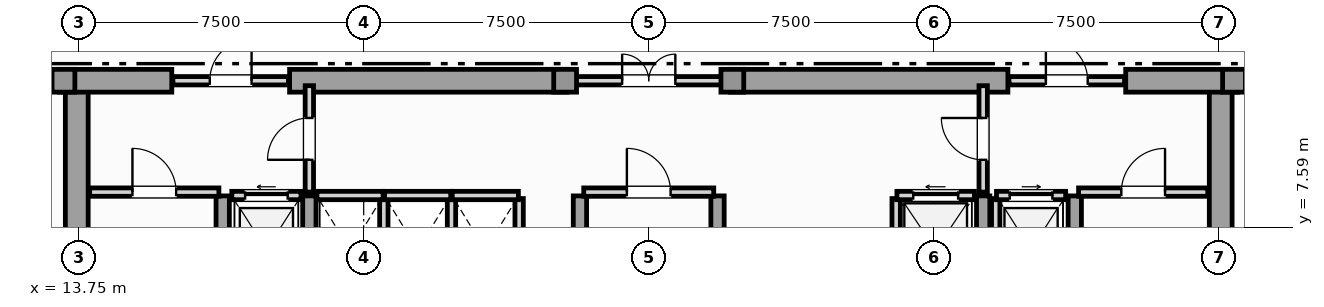
"""IFC4 building model, lengths in metres.
Left out: names, types, materials, properties, quantities, classifications, styles, units other than length and angle.
Written with IfcOpenShell. Run it as: python <this file> out.ifc"""

import sys

from ifc_helpers import new_model, si_unit, direction, frame, frame_2d, origin, origin_2d, place, context, subcontext, project, spatial, rectangle, extrude, element, fill, save


model = new_model("IFC4")
c1 = context("Model", 3, precision=1e-05, world=origin(), true_north=direction((0.0, 1.0)))
c2 = subcontext(c1, "Body", "Model", "MODEL_VIEW")
j1 = project(units=[si_unit("LENGTHUNIT", "METRE"), si_unit("PLANEANGLEUNIT", "RADIAN")], contexts=[c1])
p1 = place(None, origin())
s1 = spatial("IfcSite", under=j1, at=p1, CompositionType="ELEMENT")
p2 = place(p1, origin())
s2 = spatial("IfcBuilding", under=s1, at=p2, CompositionType="ELEMENT")
p3 = place(p2, frame((0.0, 0.0, 234.95)))
s3 = spatial("IfcBuildingStorey", under=s2, at=p3, CompositionType="ELEMENT", Elevation=234.95)
for number, where, z_axis, x_axis in (
    (1, (13.7, 0.92, 0.0), (0.0, 0.0, 1.0), (0.0, 1.0, 0.0)),
    (2, (43.8, 0.92, 0.0), (0.0, 0.0, 1.0), (0.0, 1.0, 0.0)),
):
    element("IfcWall", number, at=place(p3, frame(where, z_axis=z_axis, x_axis=x_axis)), inside=s3, PredefinedType="SHEAR", context=c2, shape_type="SweptSolid", body=[
        extrude(rectangle(XDim=10.53, YDim=0.6, at=frame_2d((5.265, 0.0))), origin(), (0.0, 0.0, 1.0), 3.63),
    ])
p4 = place(p3, frame((13.25, 11.45, 0.0), z_axis=(0.0, 0.0, 1.0), x_axis=(1.0, 0.0, 0.0)))
e3 = element("IfcWall", 3, at=p4, inside=s3, PredefinedType="SHEAR", context=c2, shape_type="SweptSolid", body=[
    extrude(rectangle(XDim=2.95, YDim=0.6, at=frame_2d((1.475, 0.0))), origin(), (0.0, 0.0, 1.0), 3.63),
])
for number, where, z_axis, x_axis in (
    (4, (19.3, 11.45, 0.0), (0.0, 0.0, 1.0), (1.0, 0.0, 0.0)),
    (5, (30.9, 11.45, 0.0), (0.0, 0.0, 1.0), (1.0, 0.0, 0.0)),
):
    element("IfcWall", number, at=place(p3, frame(where, z_axis=z_axis, x_axis=x_axis)), inside=s3, PredefinedType="SHEAR", context=c2, shape_type="SweptSolid", body=[
        extrude(rectangle(XDim=7.3, YDim=0.6, at=frame_2d((3.65, 0.0))), origin(), (0.0, 0.0, 1.0), 3.63),
    ])
p5 = place(p3, frame((41.3, 11.45, 0.0), z_axis=(0.0, 0.0, 1.0), x_axis=(1.0, 0.0, 0.0)))
e6 = element("IfcWall", 6, at=p5, inside=s3, PredefinedType="SHEAR", context=c2, shape_type="SweptSolid", body=[
    extrude(rectangle(XDim=2.95, YDim=0.6, at=frame_2d((1.475, 0.0))), origin(), (0.0, 0.0, 1.0), 3.63),
])
for number, where, z_axis, x_axis in (
    (7, (17.54, 0.92, 0.0), (0.0, 0.0, 1.0), (0.0, 1.0, 0.0)),
    (8, (19.82, 0.92, 0.0), (0.0, 0.0, 1.0), (0.0, 1.0, 0.0)),
    (9, (26.94, 0.92, 0.0), (0.0, 0.0, 1.0), (0.0, 1.0, 0.0)),
    (10, (30.56, 0.92, 0.0), (0.0, 0.0, 1.0), (0.0, 1.0, 0.0)),
    (11, (37.55, 0.92, 0.0), (0.0, 0.0, 1.0), (0.0, 1.0, 0.0)),
    (12, (39.96, 0.92, 0.0), (0.0, 0.0, 1.0), (0.0, 1.0, 0.0)),
):
    element("IfcWall", number, at=place(p3, frame(where, z_axis=z_axis, x_axis=x_axis)), inside=s3, PredefinedType="SHEAR", context=c2, shape_type="SweptSolid", body=[
        extrude(rectangle(XDim=7.5, YDim=0.35, at=frame_2d((3.75, 0.0))), origin(), (0.0, 0.0, 1.0), 3.63),
    ])
for number, where, z_axis, x_axis in (
    (13, (13.35, 11.45, 0.0), (0.0, 0.0, 1.0), (1.0, 0.0, 0.0)),
    (14, (44.15, 11.45, 0.0), (0.0, 0.0, 1.0), (1.0, 0.0, 0.0)),
    (15, (26.55, 11.45, 0.0), (0.0, 0.0, 1.0), (1.0, 0.0, 0.0)),
    (16, (30.95, 11.45, 0.0), (0.0, 0.0, 1.0), (1.0, 0.0, 0.0)),
):
    element("IfcColumn", number, at=place(p3, frame(where, z_axis=z_axis, x_axis=x_axis)), inside=s3, PredefinedType="COLUMN", context=c2, shape_type="SweptSolid", body=[
        extrude(rectangle(XDim=0.6, YDim=0.6, at=origin_2d()), origin(), (0.0, 0.0, 1.0), 3.85),
    ])
p6 = place(p3, frame((17.78, 8.43, 0.0), z_axis=(0.0, 0.0, 1.0), x_axis=(1.0, 0.0, 0.0)))
e17 = element("IfcWall", 17, at=p6, inside=s3, PredefinedType="SOLIDWALL", context=c2, shape_type="SweptSolid", body=[
    extrude(rectangle(XDim=1.82, YDim=0.22, at=frame_2d((0.91, 0.0))), origin(), (0.0, 0.0, 1.0), 3.63),
])
p7 = place(p6, frame((0.35, 0.0, 0.0)))
e18 = element("IfcOpeningElement", 18, at=p7, cuts=e17, PredefinedType="OPENING", context=c2, shape_type="SweptSolid", body=[
    extrude(rectangle(XDim=1.12, YDim=2.25, at=frame_2d((0.56, 1.125))), frame((0.0, 0.12, 0.0), z_axis=(0.0, -1.0, 0.0), x_axis=(1.0, 0.0, 0.0)), (0.0, 0.0, 1.0), 0.24),
])
p8 = place(p3, frame((37.88, 5.65, 0.0), z_axis=(0.0, 0.0, 1.0), x_axis=(0.0, 1.0, 0.0)))
e19 = element("IfcWall", 19, at=p8, inside=s3, PredefinedType="SOLIDWALL", context=c2, shape_type="SweptSolid", body=[
    extrude(rectangle(XDim=2.7, YDim=0.22, at=frame_2d((1.35, 0.0))), origin(), (0.0, 0.0, 1.0), 3.63),
])
p9 = place(p3, frame((37.9, 8.43, 0.0), z_axis=(0.0, 0.0, 1.0), x_axis=(1.0, 0.0, 0.0)))
e20 = element("IfcWall", 20, at=p9, inside=s3, PredefinedType="SOLIDWALL", context=c2, shape_type="SweptSolid", body=[
    extrude(rectangle(XDim=1.82, YDim=0.22, at=frame_2d((0.91, 0.0))), origin(), (0.0, 0.0, 1.0), 3.63),
])
p10 = place(p9, frame((0.35, 0.0, 0.0)))
e21 = element("IfcOpeningElement", 21, at=p10, cuts=e20, PredefinedType="OPENING", context=c2, shape_type="SweptSolid", body=[
    extrude(rectangle(XDim=1.12, YDim=2.25, at=frame_2d((0.56, 1.125))), frame((0.0, 0.12, 0.0), z_axis=(0.0, -1.0, 0.0), x_axis=(1.0, 0.0, 0.0)), (0.0, 0.0, 1.0), 0.24),
])
p11 = place(p3, frame((35.26, 5.65, 0.0), z_axis=(0.0, 0.0, 1.0), x_axis=(0.0, 1.0, 0.0)))
e22 = element("IfcWall", 22, at=p11, inside=s3, PredefinedType="SOLIDWALL", context=c2, shape_type="SweptSolid", body=[
    extrude(rectangle(XDim=2.7, YDim=0.22, at=frame_2d((1.35, 0.0))), origin(), (0.0, 0.0, 1.0), 3.63),
])
p12 = place(p3, frame((35.28, 8.43, 0.0), z_axis=(0.0, 0.0, 1.0), x_axis=(1.0, 0.0, 0.0)))
e23 = element("IfcWall", 23, at=p12, inside=s3, PredefinedType="SOLIDWALL", context=c2, shape_type="SweptSolid", body=[
    extrude(rectangle(XDim=2.04, YDim=0.22, at=frame_2d((1.02, 0.0))), origin(), (0.0, 0.0, 1.0), 3.63),
])
p13 = place(p12, frame((0.43, 0.0, 0.0)))
e24 = element("IfcOpeningElement", 24, at=p13, cuts=e23, PredefinedType="OPENING", context=c2, shape_type="SweptSolid", body=[
    extrude(rectangle(XDim=1.18, YDim=2.2, at=frame_2d((0.59, 1.1))), frame((0.0, 0.12, 0.0), z_axis=(0.0, -1.0, 0.0), x_axis=(1.0, 0.0, 0.0)), (0.0, 0.0, 1.0), 0.24),
])
p14 = place(p3, frame((21.78, 5.65, 0.0), z_axis=(0.0, 0.0, 1.0), x_axis=(0.0, 1.0, 0.0)))
e25 = element("IfcWall", 25, at=p14, inside=s3, PredefinedType="SOLIDWALL", context=c2, shape_type="SweptSolid", body=[
    extrude(rectangle(XDim=2.7, YDim=0.22, at=frame_2d((1.35, 0.0))), origin(), (0.0, 0.0, 1.0), 3.63),
])
p15 = place(p3, frame((20.02, 8.43, 0.0), z_axis=(0.0, 0.0, 1.0), x_axis=(1.0, 0.0, 0.0)))
e26 = element("IfcWall", 26, at=p15, inside=s3, PredefinedType="SOLIDWALL", context=c2, shape_type="SweptSolid", body=[
    extrude(rectangle(XDim=1.74, YDim=0.22, at=frame_2d((0.87, 0.0))), origin(), (0.0, 0.0, 1.0), 3.63),
])
p16 = place(p3, frame((23.56, 5.65, 0.0), z_axis=(0.0, 0.0, 1.0), x_axis=(0.0, 1.0, 0.0)))
e27 = element("IfcWall", 27, at=p16, inside=s3, PredefinedType="SOLIDWALL", context=c2, shape_type="SweptSolid", body=[
    extrude(rectangle(XDim=2.7, YDim=0.22, at=frame_2d((1.35, 0.0))), origin(), (0.0, 0.0, 1.0), 3.63),
])
p17 = place(p3, frame((21.8, 8.43, 0.0), z_axis=(0.0, 0.0, 1.0), x_axis=(1.0, 0.0, 0.0)))
e28 = element("IfcWall", 28, at=p17, inside=s3, PredefinedType="SOLIDWALL", context=c2, shape_type="SweptSolid", body=[
    extrude(rectangle(XDim=1.74, YDim=0.22, at=frame_2d((0.87, 0.0))), origin(), (0.0, 0.0, 1.0), 3.63),
])
p18 = place(p3, frame((25.34, 5.65, 0.0), z_axis=(0.0, 0.0, 1.0), x_axis=(0.0, 1.0, 0.0)))
e29 = element("IfcWall", 29, at=p18, inside=s3, PredefinedType="SOLIDWALL", context=c2, shape_type="SweptSolid", body=[
    extrude(rectangle(XDim=2.7, YDim=0.22, at=frame_2d((1.35, 0.0))), origin(), (0.0, 0.0, 1.0), 3.63),
])
p19 = place(p3, frame((23.58, 8.43, 0.0), z_axis=(0.0, 0.0, 1.0), x_axis=(1.0, 0.0, 0.0)))
e30 = element("IfcWall", 30, at=p19, inside=s3, PredefinedType="SOLIDWALL", context=c2, shape_type="SweptSolid", body=[
    extrude(rectangle(XDim=1.74, YDim=0.22, at=frame_2d((0.87, 0.0))), origin(), (0.0, 0.0, 1.0), 3.63),
])
p20 = place(p3, frame((14.04, 8.52, 0.0), z_axis=(0.0, 0.0, 1.0), x_axis=(1.0, 0.0, 0.0)))
e31 = element("IfcWall", 31, at=p20, inside=s3, PredefinedType="SOLIDWALL", context=c2, shape_type="SweptSolid", body=[
    extrude(rectangle(XDim=3.4, YDim=0.22, at=frame_2d((1.7, 0.0))), origin(), (0.0, 0.0, 1.0), 3.63),
])
p21 = place(p20, frame((1.125, 0.0, 0.0)))
e32 = element("IfcOpeningElement", 32, at=p21, cuts=e31, PredefinedType="OPENING", context=c2, shape_type="SweptSolid", body=[
    extrude(rectangle(XDim=1.15, YDim=2.2, at=frame_2d((0.575, 1.1))), frame((0.0, 0.12, 0.0), z_axis=(0.0, -1.0, 0.0), x_axis=(1.0, 0.0, 0.0)), (0.0, 0.0, 1.0), 0.24),
])
p22 = place(p3, frame((40.06, 8.52, 0.0), z_axis=(0.0, 0.0, 1.0), x_axis=(1.0, 0.0, 0.0)))
e33 = element("IfcWall", 33, at=p22, inside=s3, PredefinedType="SOLIDWALL", context=c2, shape_type="SweptSolid", body=[
    extrude(rectangle(XDim=3.4, YDim=0.22, at=frame_2d((1.7, 0.0))), origin(), (0.0, 0.0, 1.0), 3.63),
])
p23 = place(p22, frame((1.125, 0.0, 0.0)))
e34 = element("IfcOpeningElement", 34, at=p23, cuts=e33, PredefinedType="OPENING", context=c2, shape_type="SweptSolid", body=[
    extrude(rectangle(XDim=1.15, YDim=2.2, at=frame_2d((0.575, 1.1))), frame((0.0, 0.12, 0.0), z_axis=(0.0, -1.0, 0.0), x_axis=(1.0, 0.0, 0.0)), (0.0, 0.0, 1.0), 0.24),
])
p24 = place(p3, frame((27.04, 8.52, 0.0), z_axis=(0.0, 0.0, 1.0), x_axis=(1.0, 0.0, 0.0)))
e35 = element("IfcWall", 35, at=p24, inside=s3, PredefinedType="SOLIDWALL", context=c2, shape_type="SweptSolid", body=[
    extrude(rectangle(XDim=3.42, YDim=0.22, at=frame_2d((1.71, 0.0))), origin(), (0.0, 0.0, 1.0), 3.63),
])
p25 = place(p24, frame((1.135, 0.0, 0.0)))
e36 = element("IfcOpeningElement", 36, at=p25, cuts=e35, PredefinedType="OPENING", context=c2, shape_type="SweptSolid", body=[
    extrude(rectangle(XDim=1.15, YDim=2.2, at=frame_2d((0.575, 1.1))), frame((0.0, 0.12, 0.0), z_axis=(0.0, -1.0, 0.0), x_axis=(1.0, 0.0, 0.0)), (0.0, 0.0, 1.0), 0.24),
])
p26 = place(p3, frame((19.82, 8.52, 0.0), z_axis=(0.0, 0.0, 1.0), x_axis=(0.0, 1.0, 0.0)))
e37 = element("IfcWall", 37, at=p26, inside=s3, PredefinedType="SOLIDWALL", context=c2, shape_type="SweptSolid", body=[
    extrude(rectangle(XDim=2.8, YDim=0.22, at=frame_2d((1.4, 0.0))), origin(), (0.0, 0.0, 1.0), 3.085),
])
p27 = place(p26, frame((0.85, 0.0, 0.0)))
e38 = element("IfcOpeningElement", 38, at=p27, cuts=e37, PredefinedType="OPENING", context=c2, shape_type="SweptSolid", body=[
    extrude(rectangle(XDim=1.1, YDim=2.2, at=frame_2d((0.55, 1.1))), frame((0.0, 0.12, 0.0), z_axis=(0.0, -1.0, 0.0), x_axis=(1.0, 0.0, 0.0)), (0.0, 0.0, 1.0), 0.24),
])
p28 = place(p3, frame((37.55, 8.52, 0.0), z_axis=(0.0, 0.0, 1.0), x_axis=(0.0, 1.0, 0.0)))
e39 = element("IfcWall", 39, at=p28, inside=s3, PredefinedType="SOLIDWALL", context=c2, shape_type="SweptSolid", body=[
    extrude(rectangle(XDim=2.8, YDim=0.22, at=frame_2d((1.4, 0.0))), origin(), (0.0, 0.0, 1.0), 3.085),
])
p29 = place(p28, frame((0.85, 0.0, 0.0)))
e40 = element("IfcOpeningElement", 40, at=p29, cuts=e39, PredefinedType="OPENING", context=c2, shape_type="SweptSolid", body=[
    extrude(rectangle(XDim=1.1, YDim=2.2, at=frame_2d((0.55, 1.1))), frame((0.0, 0.12, 0.0), z_axis=(0.0, -1.0, 0.0), x_axis=(1.0, 0.0, 0.0)), (0.0, 0.0, 1.0), 0.24),
])
p30 = place(p3, frame((16.23, 11.45, 0.0), z_axis=(0.0, 0.0, 1.0), x_axis=(1.0, 0.0, 0.0)))
e41 = element("IfcWall", 41, at=p30, inside=s3, PredefinedType="SOLIDWALL", context=c2, shape_type="SweptSolid", body=[
    extrude(rectangle(XDim=3.04, YDim=0.22, at=frame_2d((1.52, 0.0))), origin(), (0.0, 0.0, 1.0), 3.63),
])
p31 = place(p30, frame((0.97, 0.0, 0.0)))
e42 = element("IfcOpeningElement", 42, at=p31, cuts=e41, PredefinedType="OPENING", context=c2, shape_type="SweptSolid", body=[
    extrude(rectangle(XDim=1.1, YDim=2.2, at=frame_2d((0.55, 1.1))), frame((0.0, 0.12, 0.0), z_axis=(0.0, -1.0, 0.0), x_axis=(1.0, 0.0, 0.0)), (0.0, 0.0, 1.0), 0.24),
])
p32 = place(p3, frame((26.63, 11.45, 0.0), z_axis=(0.0, 0.0, 1.0), x_axis=(1.0, 0.0, 0.0)))
e43 = element("IfcWall", 43, at=p32, inside=s3, PredefinedType="SOLIDWALL", context=c2, shape_type="SweptSolid", body=[
    extrude(rectangle(XDim=4.24, YDim=0.22, at=frame_2d((2.12, 0.0))), origin(), (0.0, 0.0, 1.0), 3.63),
])
p33 = place(p32, frame((1.42, 0.0, 0.0)))
e44 = element("IfcOpeningElement", 44, at=p33, cuts=e43, PredefinedType="OPENING", context=c2, shape_type="SweptSolid", body=[
    extrude(rectangle(XDim=1.4, YDim=2.2, at=frame_2d((0.7, 1.1))), frame((0.0, 0.12, 0.0), z_axis=(0.0, -1.0, 0.0), x_axis=(1.0, 0.0, 0.0)), (0.0, 0.0, 1.0), 0.24),
])
p34 = place(p3, frame((38.23, 11.45, 0.0), z_axis=(0.0, 0.0, 1.0), x_axis=(1.0, 0.0, 0.0)))
e45 = element("IfcWall", 45, at=p34, inside=s3, PredefinedType="SOLIDWALL", context=c2, shape_type="SweptSolid", body=[
    extrude(rectangle(XDim=3.04, YDim=0.22, at=frame_2d((1.52, 0.0))), origin(), (0.0, 0.0, 1.0), 3.63),
])
p35 = place(p34, frame((0.97, 0.0, 0.0)))
e46 = element("IfcOpeningElement", 46, at=p35, cuts=e45, PredefinedType="OPENING", context=c2, shape_type="SweptSolid", body=[
    extrude(rectangle(XDim=1.1, YDim=2.2, at=frame_2d((0.55, 1.1))), frame((0.0, 0.12, 0.0), z_axis=(0.0, -1.0, 0.0), x_axis=(1.0, 0.0, 0.0)), (0.0, 0.0, 1.0), 0.24),
])
p36 = place(p7, origin())
e47 = element("IfcDoor", 47, at=p36, inside=s3, OperationType="SLIDING_TO_LEFT", PredefinedType="DOOR", context=c2, shape_type="SweptSolid", body=[
    extrude(rectangle(XDim=1.12, YDim=2.25, at=frame_2d((0.56, 1.125))), frame((0.0, 0.025, 0.0), z_axis=(0.0, -1.0, 0.0), x_axis=(1.0, 0.0, 0.0)), (0.0, 0.0, 1.0), 0.05),
])
fill(e18, e47)
p37 = place(p10, origin())
e48 = element("IfcDoor", 48, at=p37, inside=s3, OperationType="SLIDING_TO_RIGHT", PredefinedType="DOOR", context=c2, shape_type="SweptSolid", body=[
    extrude(rectangle(XDim=1.12, YDim=2.25, at=frame_2d((0.56, 1.125))), frame((0.0, 0.025, 0.0), z_axis=(0.0, -1.0, 0.0), x_axis=(1.0, 0.0, 0.0)), (0.0, 0.0, 1.0), 0.05),
])
fill(e21, e48)
p38 = place(p13, origin())
e49 = element("IfcDoor", 49, at=p38, inside=s3, OperationType="SLIDING_TO_LEFT", PredefinedType="DOOR", context=c2, shape_type="SweptSolid", body=[
    extrude(rectangle(XDim=1.18, YDim=2.2, at=frame_2d((0.59, 1.1))), frame((0.0, 0.025, 0.0), z_axis=(0.0, -1.0, 0.0), x_axis=(1.0, 0.0, 0.0)), (0.0, 0.0, 1.0), 0.05),
])
fill(e24, e49)
p39 = place(p21, origin())
e50 = element("IfcDoor", 50, at=p39, inside=s3, OperationType="SINGLE_SWING_LEFT", PredefinedType="DOOR", context=c2, shape_type="SweptSolid", body=[
    extrude(rectangle(XDim=1.15, YDim=2.2, at=frame_2d((0.575, 1.1))), frame((0.0, 0.025, 0.0), z_axis=(0.0, -1.0, 0.0), x_axis=(1.0, 0.0, 0.0)), (0.0, 0.0, 1.0), 0.05),
])
fill(e32, e50)
p40 = place(p23, origin())
e51 = element("IfcDoor", 51, at=p40, inside=s3, OperationType="SINGLE_SWING_RIGHT", PredefinedType="DOOR", context=c2, shape_type="SweptSolid", body=[
    extrude(rectangle(XDim=1.15, YDim=2.2, at=frame_2d((0.575, 1.1))), frame((0.0, 0.025, 0.0), z_axis=(0.0, -1.0, 0.0), x_axis=(1.0, 0.0, 0.0)), (0.0, 0.0, 1.0), 0.05),
])
fill(e34, e51)
p41 = place(p25, origin())
e52 = element("IfcDoor", 52, at=p41, inside=s3, OperationType="SINGLE_SWING_LEFT", PredefinedType="DOOR", context=c2, shape_type="SweptSolid", body=[
    extrude(rectangle(XDim=1.15, YDim=2.2, at=frame_2d((0.575, 1.1))), frame((0.0, 0.025, 0.0), z_axis=(0.0, -1.0, 0.0), x_axis=(1.0, 0.0, 0.0)), (0.0, 0.0, 1.0), 0.05),
])
fill(e36, e52)
p42 = place(p27, origin())
e53 = element("IfcDoor", 53, at=p42, inside=s3, OperationType="SINGLE_SWING_LEFT", PredefinedType="DOOR", context=c2, shape_type="SweptSolid", body=[
    extrude(rectangle(XDim=1.1, YDim=2.2, at=frame_2d((0.55, 1.1))), frame((0.0, 0.025, 0.0), z_axis=(0.0, -1.0, 0.0), x_axis=(1.0, 0.0, 0.0)), (0.0, 0.0, 1.0), 0.05),
])
fill(e38, e53)
p43 = place(p29, origin())
e54 = element("IfcDoor", 54, at=p43, inside=s3, OperationType="SINGLE_SWING_RIGHT", PredefinedType="DOOR", context=c2, shape_type="SweptSolid", body=[
    extrude(rectangle(XDim=1.1, YDim=2.2, at=frame_2d((0.55, 1.1))), frame((0.0, 0.025, 0.0), z_axis=(0.0, -1.0, 0.0), x_axis=(1.0, 0.0, 0.0)), (0.0, 0.0, 1.0), 0.05),
])
fill(e40, e54)
p44 = place(p31, origin())
e55 = element("IfcDoor", 55, at=p44, inside=s3, OperationType="SINGLE_SWING_RIGHT", PredefinedType="DOOR", context=c2, shape_type="SweptSolid", body=[
    extrude(rectangle(XDim=1.1, YDim=2.2, at=frame_2d((0.55, 1.1))), frame((0.0, 0.025, 0.0), z_axis=(0.0, -1.0, 0.0), x_axis=(1.0, 0.0, 0.0)), (0.0, 0.0, 1.0), 0.05),
])
fill(e42, e55)
p45 = place(p33, origin())
e56 = element("IfcDoor", 56, at=p45, inside=s3, OperationType="DOUBLE_DOOR_SINGLE_SWING", PredefinedType="DOOR", context=c2, shape_type="SweptSolid", body=[
    extrude(rectangle(XDim=1.4, YDim=2.2, at=frame_2d((0.7, 1.1))), frame((0.0, 0.025, 0.0), z_axis=(0.0, -1.0, 0.0), x_axis=(1.0, 0.0, 0.0)), (0.0, 0.0, 1.0), 0.05),
])
fill(e44, e56)
p46 = place(p35, origin())
e57 = element("IfcDoor", 57, at=p46, inside=s3, OperationType="SINGLE_SWING_LEFT", PredefinedType="DOOR", context=c2, shape_type="SweptSolid", body=[
    extrude(rectangle(XDim=1.1, YDim=2.2, at=frame_2d((0.55, 1.1))), frame((0.0, 0.025, 0.0), z_axis=(0.0, -1.0, 0.0), x_axis=(1.0, 0.0, 0.0)), (0.0, 0.0, 1.0), 0.05),
])
fill(e46, e57)
save(model, sys.argv[1])
